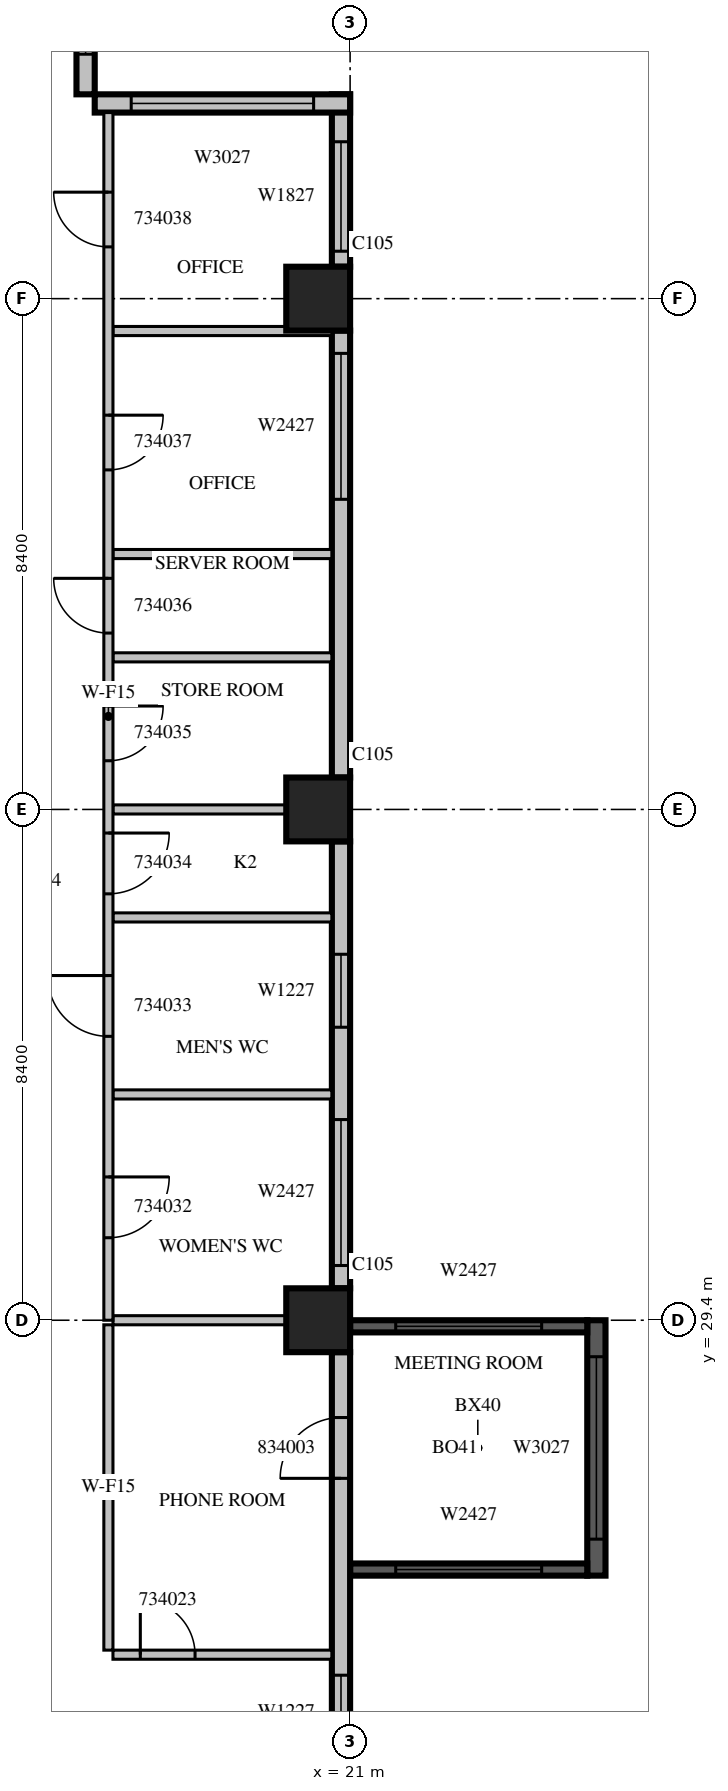
"""IFC4 building model, lengths in metres.
Left out: names, types, materials, properties, quantities, classifications, styles, units other than length and angle.
Written with IfcOpenShell. Run it as: python <this file> out.ifc"""

import sys

from ifc_helpers import new_model, si_unit, direction, frame, frame_2d, origin, origin_2d, place, context, subcontext, project, spatial, rectangle, extrude, source, transform, mapped, element, fill, save


model = new_model("IFC4")
c1 = context("Model", 3, precision=1e-05, world=origin(), true_north=direction((0.0, 1.0)))
c2 = subcontext(c1, "Body", "Model", "MODEL_VIEW")
j1 = project(units=[si_unit("LENGTHUNIT", "METRE"), si_unit("PLANEANGLEUNIT", "RADIAN")], contexts=[c1])
p1 = place(None, origin())
s1 = spatial("IfcSite", under=j1, at=p1, CompositionType="ELEMENT")
p2 = place(p1, origin())
s2 = spatial("IfcBuilding", under=s1, at=p2, CompositionType="ELEMENT")
p3 = place(p2, frame((0.0, 0.0, 153.9)))
s3 = spatial("IfcBuildingStorey", under=s2, at=p3, CompositionType="ELEMENT", Elevation=153.9)
m1 = source(origin(), c2, "Body", "SweptSolid", [
    extrude(rectangle(XDim=1.05, YDim=1.05, at=origin_2d()), origin(), (0.0, 0.0, 1.0), 4.2),
])
for number, where, z_axis, x_axis in (
    (1, (20.475, 29.4, 0.0), (0.0, 0.0, 1.0), (1.0, 0.0, 0.0)),
    (2, (20.475, 37.8, 0.0), (0.0, 0.0, 1.0), (1.0, 0.0, 0.0)),
    (3, (20.475, 46.2, 0.0), (0.0, 0.0, 1.0), (1.0, 0.0, 0.0)),
):
    element("IfcColumn", number, at=place(p3, frame(where, z_axis=z_axis, x_axis=x_axis)), inside=s3, PredefinedType="COLUMN", context=c2, shape_type="MappedRepresentation", body=[
        mapped(m1, transform((0.0, 0.0, 0.0), scale=1.0)),
    ])
m2 = source(origin(), c2, "Body", "SweptSolid", [
    extrude(rectangle(XDim=4.2, YDim=0.3, at=frame_2d((2.1, 0.0))), origin(), (0.0, 0.0, 1.0), 3.8),
])
p4 = place(p3, frame((25.05, 25.2, 0.0), z_axis=(0.0, 0.0, 1.0), x_axis=(0.0, 1.0, 0.0)))
e4 = element("IfcWall", 4, at=p4, inside=s3, PredefinedType="SOLIDWALL", context=c2, shape_type="MappedRepresentation", body=[
    mapped(m2, transform((0.0, 0.0, 0.0), scale=1.0)),
])
m3 = source(origin(), c2, "Body", "SweptSolid", [
    extrude(rectangle(XDim=3.0, YDim=2.7, at=frame_2d((1.5, 1.35))), frame((0.0, 0.16, 0.0), z_axis=(0.0, -1.0, 0.0), x_axis=(1.0, 0.0, 0.0)), (0.0, 0.0, 1.0), 0.32),
])
p5 = place(p4, frame((0.6, 0.0, 0.6)))
e5 = element("IfcOpeningElement", 5, at=p5, cuts=e4, PredefinedType="OPENING", context=c2, shape_type="MappedRepresentation", body=[
    mapped(m3, transform((0.0, 0.0, 0.0), scale=1.0)),
])
m4 = source(origin(), c2, "Body", "SweptSolid", [
    extrude(rectangle(XDim=3.9, YDim=0.2, at=frame_2d((1.95, 0.0))), origin(), (0.0, 0.0, 1.0), 3.8),
])
p6 = place(p3, frame((21.0, 25.3, 0.0), z_axis=(0.0, 0.0, 1.0), x_axis=(1.0, 0.0, 0.0)))
e6 = element("IfcWall", 6, at=p6, inside=s3, PredefinedType="SOLIDWALL", context=c2, shape_type="MappedRepresentation", body=[
    mapped(m4, transform((0.0, 0.0, 0.0), scale=1.0)),
])
m5 = source(origin(), c2, "Body", "SweptSolid", [
    extrude(rectangle(XDim=2.4, YDim=2.7, at=frame_2d((1.2, 1.35))), frame((0.0, 0.11, 0.0), z_axis=(0.0, -1.0, 0.0), x_axis=(1.0, 0.0, 0.0)), (0.0, 0.0, 1.0), 0.22),
])
p7 = place(p6, frame((0.75, 0.0, 0.6)))
e7 = element("IfcOpeningElement", 7, at=p7, cuts=e6, PredefinedType="OPENING", context=c2, shape_type="MappedRepresentation", body=[
    mapped(m5, transform((0.0, 0.0, 0.0), scale=1.0)),
])
p8 = place(p3, frame((21.0, 29.3, 0.0), z_axis=(0.0, 0.0, 1.0), x_axis=(1.0, 0.0, 0.0)))
e8 = element("IfcWall", 8, at=p8, inside=s3, PredefinedType="SOLIDWALL", context=c2, shape_type="MappedRepresentation", body=[
    mapped(m4, transform((0.0, 0.0, 0.0), scale=1.0)),
])
p9 = place(p8, frame((0.75, 0.0, 0.6)))
e9 = element("IfcOpeningElement", 9, at=p9, cuts=e8, PredefinedType="OPENING", context=c2, shape_type="MappedRepresentation", body=[
    mapped(m5, transform((0.0, 0.0, 0.0), scale=1.0)),
])
m6 = source(origin(), c2, "Body", "SweptSolid", [
    extrude(rectangle(XDim=6.875, YDim=0.3, at=frame_2d((3.438, 0.0))), origin(), (0.0, 0.0, 1.0), 3.8),
])
p10 = place(p3, frame((20.85, 22.0, 0.0), z_axis=(0.0, 0.0, 1.0), x_axis=(0.0, 1.0, 0.0)))
e10 = element("IfcWall", 10, at=p10, inside=s3, PredefinedType="STANDARD", context=c2, shape_type="MappedRepresentation", body=[
    mapped(m6, transform((0.0, 0.0, 0.0), scale=1.0)),
])
m7 = source(origin(), c2, "Body", "SweptSolid", [
    extrude(rectangle(XDim=1.2, YDim=2.7, at=frame_2d((0.6, 1.35))), frame((0.0, 0.16, 0.0), z_axis=(0.0, -1.0, 0.0), x_axis=(1.0, 0.0, 0.0)), (0.0, 0.0, 1.0), 0.32),
])
p11 = place(p10, frame((0.362, 0.0, 0.6)))
e11 = element("IfcOpeningElement", 11, at=p11, cuts=e10, PredefinedType="OPENING", context=c2, shape_type="MappedRepresentation", body=[
    mapped(m7, transform((0.0, 0.0, 0.0), scale=1.0)),
])
m8 = source(origin(), c2, "Body", "SweptSolid", [
    extrude(rectangle(XDim=1.0, YDim=2.1, at=frame_2d((0.5, 1.05))), frame((0.0, 0.16, 0.0), z_axis=(0.0, -1.0, 0.0), x_axis=(1.0, 0.0, 0.0)), (0.0, 0.0, 1.0), 0.32),
])
p12 = place(p10, frame((4.8, 0.0, 0.0)))
e12 = element("IfcOpeningElement", 12, at=p12, cuts=e10, PredefinedType="OPENING", context=c2, shape_type="MappedRepresentation", body=[
    mapped(m8, transform((0.0, 0.0, 0.0), scale=1.0)),
])
m9 = source(origin(), c2, "Body", "SweptSolid", [
    extrude(rectangle(XDim=7.35, YDim=0.3, at=frame_2d((3.675, 0.0))), origin(), (0.0, 0.0, 1.0), 3.8),
])
p13 = place(p3, frame((20.85, 29.925, 0.0), z_axis=(0.0, 0.0, 1.0), x_axis=(0.0, 1.0, 0.0)))
e13 = element("IfcWall", 13, at=p13, inside=s3, PredefinedType="STANDARD", context=c2, shape_type="MappedRepresentation", body=[
    mapped(m9, transform((0.0, 0.0, 0.0), scale=1.0)),
])
m10 = source(origin(), c2, "Body", "SweptSolid", [
    extrude(rectangle(XDim=2.4, YDim=2.7, at=frame_2d((1.2, 1.35))), frame((0.0, 0.16, 0.0), z_axis=(0.0, -1.0, 0.0), x_axis=(1.0, 0.0, 0.0)), (0.0, 0.0, 1.0), 0.32),
])
p14 = place(p13, frame((0.375, 0.0, 0.6)))
e14 = element("IfcOpeningElement", 14, at=p14, cuts=e13, PredefinedType="OPENING", context=c2, shape_type="MappedRepresentation", body=[
    mapped(m10, transform((0.0, 0.0, 0.0), scale=1.0)),
])
p15 = place(p13, frame((4.293, 0.0, 0.6)))
e15 = element("IfcOpeningElement", 15, at=p15, cuts=e13, PredefinedType="OPENING", context=c2, shape_type="MappedRepresentation", body=[
    mapped(m7, transform((0.0, 0.0, 0.0), scale=1.0)),
])
p16 = place(p3, frame((20.85, 38.325, 0.0), z_axis=(0.0, 0.0, 1.0), x_axis=(0.0, 1.0, 0.0)))
e16 = element("IfcWall", 16, at=p16, inside=s3, PredefinedType="STANDARD", context=c2, shape_type="MappedRepresentation", body=[
    mapped(m9, transform((0.0, 0.0, 0.0), scale=1.0)),
])
p17 = place(p16, frame((4.575, 0.0, 0.6)))
e17 = element("IfcOpeningElement", 17, at=p17, cuts=e16, PredefinedType="OPENING", context=c2, shape_type="MappedRepresentation", body=[
    mapped(m10, transform((0.0, 0.0, 0.0), scale=1.0)),
])
m11 = source(origin(), c2, "Body", "SweptSolid", [
    extrude(rectangle(XDim=2.835, YDim=0.3, at=frame_2d((1.417, 0.0))), origin(), (0.0, 0.0, 1.0), 3.8),
])
p18 = place(p3, frame((20.85, 46.725, 0.0), z_axis=(0.0, 0.0, 1.0), x_axis=(0.0, 1.0, 0.0)))
e18 = element("IfcWall", 18, at=p18, inside=s3, PredefinedType="STANDARD", context=c2, shape_type="MappedRepresentation", body=[
    mapped(m11, transform((0.0, 0.0, 0.0), scale=1.0)),
])
m12 = source(origin(), c2, "Body", "SweptSolid", [
    extrude(rectangle(XDim=1.8, YDim=2.7, at=frame_2d((0.9, 1.35))), frame((0.0, 0.16, 0.0), z_axis=(0.0, -1.0, 0.0), x_axis=(1.0, 0.0, 0.0)), (0.0, 0.0, 1.0), 0.32),
])
p19 = place(p18, frame((0.255, 0.0, 0.6)))
e19 = element("IfcOpeningElement", 19, at=p19, cuts=e18, PredefinedType="OPENING", context=c2, shape_type="MappedRepresentation", body=[
    mapped(m12, transform((0.0, 0.0, 0.0), scale=1.0)),
])
m13 = source(origin(), c2, "Body", "SweptSolid", [
    extrude(rectangle(XDim=4.2, YDim=0.3, at=frame_2d((2.1, 0.0))), origin(), (0.0, 0.0, 1.0), 3.8),
])
p20 = place(p3, frame((21.0, 49.41, 0.0), z_axis=(0.0, 0.0, 1.0), x_axis=(-1.0, 0.0, 0.0)))
e20 = element("IfcWall", 20, at=p20, inside=s3, PredefinedType="STANDARD", context=c2, shape_type="MappedRepresentation", body=[
    mapped(m13, transform((0.0, 0.0, 0.0), scale=1.0)),
])
p21 = place(p20, frame((0.6, 0.0, 0.6)))
e21 = element("IfcOpeningElement", 21, at=p21, cuts=e20, PredefinedType="OPENING", context=c2, shape_type="MappedRepresentation", body=[
    mapped(m3, transform((0.0, 0.0, 0.0), scale=1.0)),
])
m14 = source(origin(), c2, "Body", "SweptSolid", [
    extrude(rectangle(XDim=2.52, YDim=0.3, at=frame_2d((1.26, 0.0))), origin(), (0.0, 0.0, 1.0), 3.8),
])
p22 = place(p3, frame((16.65, 49.56, 0.0), z_axis=(0.0, 0.0, 1.0), x_axis=(0.0, 1.0, 0.0)))
e22 = element("IfcWall", 22, at=p22, inside=s3, PredefinedType="STANDARD", context=c2, shape_type="MappedRepresentation", body=[
    mapped(m14, transform((0.0, 0.0, 0.0), scale=1.0)),
])
p23 = place(p22, frame((0.66, 0.0, 0.6)))
e23 = element("IfcOpeningElement", 23, at=p23, cuts=e22, PredefinedType="OPENING", context=c2, shape_type="MappedRepresentation", body=[
    mapped(m7, transform((0.0, 0.0, 0.0), scale=1.0)),
])
m15 = source(origin(), c2, "Body", "SweptSolid", [
    extrude(rectangle(XDim=3.6, YDim=0.15, at=frame_2d((1.8, 0.0))), origin(), (0.0, 0.0, 1.0), 3.8),
])
p24 = place(p3, frame((17.1, 23.9, 0.0), z_axis=(0.0, 0.0, 1.0), x_axis=(1.0, 0.0, 0.0)))
e24 = element("IfcWall", 24, at=p24, inside=s3, PredefinedType="PARTITIONING", context=c2, shape_type="MappedRepresentation", body=[
    mapped(m15, transform((0.0, 0.0, 0.0), scale=1.0)),
])
m16 = source(origin(), c2, "Body", "SweptSolid", [
    extrude(rectangle(XDim=0.9, YDim=2.1, at=frame_2d((0.45, 1.05))), frame((0.0, 0.085, 0.0), z_axis=(0.0, -1.0, 0.0), x_axis=(1.0, 0.0, 0.0)), (0.0, 0.0, 1.0), 0.17),
])
p25 = place(p24, frame((0.45, 0.0, 0.0)))
e25 = element("IfcOpeningElement", 25, at=p25, cuts=e24, PredefinedType="OPENING", context=c2, shape_type="MappedRepresentation", body=[
    mapped(m16, transform((0.0, 0.0, 0.0), scale=1.0)),
])
m17 = source(origin(), c2, "Body", "SweptSolid", [
    extrude(rectangle(XDim=5.35, YDim=0.15, at=frame_2d((2.675, 0.0))), origin(), (0.0, 0.0, 1.0), 3.8),
])
p26 = place(p3, frame((17.025, 29.325, 0.0), z_axis=(0.0, 0.0, 1.0), x_axis=(0.0, -1.0, 0.0)))
e26 = element("IfcWall", 26, at=p26, inside=s3, PredefinedType="PARTITIONING", context=c2, shape_type="MappedRepresentation", body=[
    mapped(m17, transform((0.0, 0.0, 0.0), scale=1.0)),
])
m18 = source(origin(), c2, "Body", "SweptSolid", [
    extrude(rectangle(XDim=2.851, YDim=0.15, at=frame_2d((1.425, 0.0))), origin(), (0.0, 0.0, 1.0), 3.8),
])
p27 = place(p3, frame((19.951, 29.4, 0.0), z_axis=(0.0, 0.0, 1.0), x_axis=(-1.0, 0.0, 0.0)))
e27 = element("IfcWall", 27, at=p27, inside=s3, PredefinedType="PARTITIONING", context=c2, shape_type="MappedRepresentation", body=[
    mapped(m18, transform((0.0, 0.0, 0.0), scale=1.0)),
])
for number, where, z_axis, x_axis in (
    (28, (17.1, 33.113, 0.0), (0.0, 0.0, 1.0), (1.0, 0.0, 0.0)),
    (29, (17.1, 36.024, 0.0), (0.0, 0.0, 1.0), (1.0, 0.0, 0.0)),
    (30, (17.1, 40.301, 0.0), (0.0, 0.0, 1.0), (1.0, 0.0, 0.0)),
    (31, (17.1, 45.667, 0.0), (0.0, 0.0, 1.0), (1.0, 0.0, 0.0)),
):
    element("IfcWall", number, at=place(p3, frame(where, z_axis=z_axis, x_axis=x_axis)), inside=s3, PredefinedType="PARTITIONING", context=c2, shape_type="MappedRepresentation", body=[
        mapped(m15, transform((0.0, 0.0, 0.0), scale=1.0)),
    ])
p28 = place(p3, frame((19.951, 37.8, 0.0), z_axis=(0.0, 0.0, 1.0), x_axis=(-1.0, 0.0, 0.0)))
e32 = element("IfcWall", 32, at=p28, inside=s3, PredefinedType="PARTITIONING", context=c2, shape_type="MappedRepresentation", body=[
    mapped(m18, transform((0.0, 0.0, 0.0), scale=1.0)),
])
p29 = place(p3, frame((20.7, 42.0, 0.0), z_axis=(0.0, 0.0, 1.0), x_axis=(-1.0, 0.0, 0.0)))
e33 = element("IfcWall", 33, at=p29, inside=s3, PredefinedType="PARTITIONING", context=c2, shape_type="MappedRepresentation", body=[
    mapped(m15, transform((0.0, 0.0, 0.0), scale=1.0)),
])
m19 = source(origin(), c2, "Body", "SweptSolid", [
    extrude(rectangle(XDim=19.86, YDim=0.15, at=frame_2d((9.93, 0.0))), origin(), (0.0, 0.0, 1.0), 3.8),
])
p30 = place(p3, frame((17.025, 49.26, 0.0), z_axis=(0.0, 0.0, 1.0), x_axis=(0.0, -1.0, 0.0)))
e34 = element("IfcWall", 34, at=p30, inside=s3, PredefinedType="PARTITIONING", context=c2, shape_type="MappedRepresentation", body=[
    mapped(m19, transform((0.0, 0.0, 0.0), scale=1.0)),
])
m20 = source(origin(), c2, "Body", "SweptSolid", [
    extrude(rectangle(XDim=1.0, YDim=2.1, at=frame_2d((0.5, 1.05))), frame((0.0, 0.085, 0.0), z_axis=(0.0, -1.0, 0.0), x_axis=(1.0, 0.0, 0.0)), (0.0, 0.0, 1.0), 0.17),
])
p31 = place(p30, frame((17.503, 0.0, 0.0)))
e35 = element("IfcOpeningElement", 35, at=p31, cuts=e34, PredefinedType="OPENING", context=c2, shape_type="MappedRepresentation", body=[
    mapped(m20, transform((0.0, 0.0, 0.0), scale=1.0)),
])
p32 = place(p30, frame((14.191, 0.0, 0.0)))
e36 = element("IfcOpeningElement", 36, at=p32, cuts=e34, PredefinedType="OPENING", context=c2, shape_type="MappedRepresentation", body=[
    mapped(m20, transform((0.0, 0.0, 0.0), scale=1.0)),
])
p33 = place(p30, frame((11.848, 0.0, 0.0)))
e37 = element("IfcOpeningElement", 37, at=p33, cuts=e34, PredefinedType="OPENING", context=c2, shape_type="MappedRepresentation", body=[
    mapped(m20, transform((0.0, 0.0, 0.0), scale=1.0)),
])
p34 = place(p30, frame((9.759, 0.0, 0.0)))
e38 = element("IfcOpeningElement", 38, at=p34, cuts=e34, PredefinedType="OPENING", context=c2, shape_type="MappedRepresentation", body=[
    mapped(m16, transform((0.0, 0.0, 0.0), scale=1.0)),
])
p35 = place(p30, frame((7.659, 0.0, 0.0)))
e39 = element("IfcOpeningElement", 39, at=p35, cuts=e34, PredefinedType="OPENING", context=c2, shape_type="MappedRepresentation", body=[
    mapped(m16, transform((0.0, 0.0, 0.0), scale=1.0)),
])
p36 = place(p30, frame((4.976, 0.0, 0.0)))
e40 = element("IfcOpeningElement", 40, at=p36, cuts=e34, PredefinedType="OPENING", context=c2, shape_type="MappedRepresentation", body=[
    mapped(m16, transform((0.0, 0.0, 0.0), scale=1.0)),
])
p37 = place(p30, frame((1.309, 0.0, 0.0)))
e41 = element("IfcOpeningElement", 41, at=p37, cuts=e34, PredefinedType="OPENING", context=c2, shape_type="MappedRepresentation", body=[
    mapped(m16, transform((0.0, 0.0, 0.0), scale=1.0)),
])
m21 = source(origin(), c2, "Body", "SweptSolid", [
    extrude(rectangle(XDim=3.0, YDim=2.7, at=frame_2d((1.5, 1.35))), frame((0.0, 0.03, 0.0), z_axis=(0.0, -1.0, 0.0), x_axis=(1.0, 0.0, 0.0)), (0.0, 0.0, 1.0), 0.06),
])
p38 = place(p5, origin())
e42 = element("IfcWindow", 42, at=p38, inside=s3, PartitioningType="SINGLE_PANEL", PredefinedType="WINDOW", context=c2, shape_type="MappedRepresentation", body=[
    mapped(m21, transform((0.0, 0.0, 0.0), scale=1.0)),
])
fill(e5, e42)
m22 = source(origin(), c2, "Body", "SweptSolid", [
    extrude(rectangle(XDim=2.4, YDim=2.7, at=frame_2d((1.2, 1.35))), frame((0.0, 0.03, 0.0), z_axis=(0.0, -1.0, 0.0), x_axis=(1.0, 0.0, 0.0)), (0.0, 0.0, 1.0), 0.06),
])
p39 = place(p7, origin())
e43 = element("IfcWindow", 43, at=p39, inside=s3, PartitioningType="SINGLE_PANEL", PredefinedType="WINDOW", context=c2, shape_type="MappedRepresentation", body=[
    mapped(m22, transform((0.0, 0.0, 0.0), scale=1.0)),
])
fill(e7, e43)
p40 = place(p9, origin())
e44 = element("IfcWindow", 44, at=p40, inside=s3, PartitioningType="SINGLE_PANEL", PredefinedType="WINDOW", context=c2, shape_type="MappedRepresentation", body=[
    mapped(m22, transform((0.0, 0.0, 0.0), scale=1.0)),
])
fill(e9, e44)
m23 = source(origin(), c2, "Body", "SweptSolid", [
    extrude(rectangle(XDim=1.2, YDim=2.7, at=frame_2d((0.6, 1.35))), frame((0.0, 0.03, 0.0), z_axis=(0.0, -1.0, 0.0), x_axis=(1.0, 0.0, 0.0)), (0.0, 0.0, 1.0), 0.06),
])
p41 = place(p11, origin())
e45 = element("IfcWindow", 45, at=p41, inside=s3, PartitioningType="SINGLE_PANEL", PredefinedType="WINDOW", context=c2, shape_type="MappedRepresentation", body=[
    mapped(m23, transform((0.0, 0.0, 0.0), scale=1.0)),
])
fill(e11, e45)
p42 = place(p14, origin())
e46 = element("IfcWindow", 46, at=p42, inside=s3, PartitioningType="SINGLE_PANEL", PredefinedType="WINDOW", context=c2, shape_type="MappedRepresentation", body=[
    mapped(m22, transform((0.0, 0.0, 0.0), scale=1.0)),
])
fill(e14, e46)
p43 = place(p15, origin())
e47 = element("IfcWindow", 47, at=p43, inside=s3, PartitioningType="SINGLE_PANEL", PredefinedType="WINDOW", context=c2, shape_type="MappedRepresentation", body=[
    mapped(m23, transform((0.0, 0.0, 0.0), scale=1.0)),
])
fill(e15, e47)
p44 = place(p17, origin())
e48 = element("IfcWindow", 48, at=p44, inside=s3, PartitioningType="SINGLE_PANEL", PredefinedType="WINDOW", context=c2, shape_type="MappedRepresentation", body=[
    mapped(m22, transform((0.0, 0.0, 0.0), scale=1.0)),
])
fill(e17, e48)
m24 = source(origin(), c2, "Body", "SweptSolid", [
    extrude(rectangle(XDim=1.8, YDim=2.7, at=frame_2d((0.9, 1.35))), frame((0.0, 0.03, 0.0), z_axis=(0.0, -1.0, 0.0), x_axis=(1.0, 0.0, 0.0)), (0.0, 0.0, 1.0), 0.06),
])
p45 = place(p19, origin())
e49 = element("IfcWindow", 49, at=p45, inside=s3, PartitioningType="SINGLE_PANEL", PredefinedType="WINDOW", context=c2, shape_type="MappedRepresentation", body=[
    mapped(m24, transform((0.0, 0.0, 0.0), scale=1.0)),
])
fill(e19, e49)
p46 = place(p21, origin())
e50 = element("IfcWindow", 50, at=p46, inside=s3, PartitioningType="SINGLE_PANEL", PredefinedType="WINDOW", context=c2, shape_type="MappedRepresentation", body=[
    mapped(m21, transform((0.0, 0.0, 0.0), scale=1.0)),
])
fill(e21, e50)
p47 = place(p23, origin())
e51 = element("IfcWindow", 51, at=p47, inside=s3, PartitioningType="SINGLE_PANEL", PredefinedType="WINDOW", context=c2, shape_type="MappedRepresentation", body=[
    mapped(m23, transform((0.0, 0.0, 0.0), scale=1.0)),
])
fill(e23, e51)
m25 = source(origin(), c2, "Body", "SweptSolid", [
    extrude(rectangle(XDim=0.9, YDim=2.1, at=frame_2d((0.45, 1.05))), frame((0.0, 0.025, 0.0), z_axis=(0.0, -1.0, 0.0), x_axis=(1.0, 0.0, 0.0)), (0.0, 0.0, 1.0), 0.05),
])
p48 = place(p25, origin())
e52 = element("IfcDoor", 52, at=p48, inside=s3, OperationType="SINGLE_SWING_LEFT", PredefinedType="DOOR", context=c2, shape_type="MappedRepresentation", body=[
    mapped(m25, transform((0.0, 0.0, 0.0), scale=1.0)),
])
fill(e25, e52)
m26 = source(origin(), c2, "Body", "SweptSolid", [
    extrude(rectangle(XDim=1.0, YDim=2.1, at=frame_2d((0.5, 1.05))), frame((0.0, 0.025, 0.0), z_axis=(0.0, -1.0, 0.0), x_axis=(1.0, 0.0, 0.0)), (0.0, 0.0, 1.0), 0.05),
])
p49 = place(p31, origin())
e53 = element("IfcDoor", 53, at=p49, inside=s3, OperationType="SINGLE_SWING_LEFT", PredefinedType="DOOR", context=c2, shape_type="MappedRepresentation", body=[
    mapped(m26, transform((0.0, 0.0, 0.0), scale=1.0)),
])
fill(e35, e53)
p50 = place(p32, origin())
e54 = element("IfcDoor", 54, at=p50, inside=s3, OperationType="SINGLE_SWING_RIGHT", PredefinedType="DOOR", context=c2, shape_type="MappedRepresentation", body=[
    mapped(m26, transform((0.0, 0.0, 0.0), scale=1.0)),
])
fill(e36, e54)
p51 = place(p33, origin())
e55 = element("IfcDoor", 55, at=p51, inside=s3, OperationType="SINGLE_SWING_LEFT", PredefinedType="DOOR", context=c2, shape_type="MappedRepresentation", body=[
    mapped(m26, transform((0.0, 0.0, 0.0), scale=1.0)),
])
fill(e37, e55)
p52 = place(p34, origin())
e56 = element("IfcDoor", 56, at=p52, inside=s3, OperationType="SINGLE_SWING_LEFT", PredefinedType="DOOR", context=c2, shape_type="MappedRepresentation", body=[
    mapped(m25, transform((0.0, 0.0, 0.0), scale=1.0)),
])
fill(e38, e56)
p53 = place(p35, origin())
e57 = element("IfcDoor", 57, at=p53, inside=s3, OperationType="SINGLE_SWING_RIGHT", PredefinedType="DOOR", context=c2, shape_type="MappedRepresentation", body=[
    mapped(m25, transform((0.0, 0.0, 0.0), scale=1.0)),
])
fill(e39, e57)
p54 = place(p36, origin())
e58 = element("IfcDoor", 58, at=p54, inside=s3, OperationType="SINGLE_SWING_LEFT", PredefinedType="DOOR", context=c2, shape_type="MappedRepresentation", body=[
    mapped(m25, transform((0.0, 0.0, 0.0), scale=1.0)),
])
fill(e40, e58)
p55 = place(p37, origin())
e59 = element("IfcDoor", 59, at=p55, inside=s3, OperationType="SINGLE_SWING_RIGHT", PredefinedType="DOOR", context=c2, shape_type="MappedRepresentation", body=[
    mapped(m25, transform((0.0, 0.0, 0.0), scale=1.0)),
])
fill(e41, e59)
p56 = place(p12, origin())
e60 = element("IfcDoor", 60, at=p56, inside=s3, OperationType="SINGLE_SWING_LEFT", PredefinedType="DOOR", context=c2, shape_type="MappedRepresentation", body=[
    mapped(m26, transform((0.0, 0.0, 0.0), scale=1.0)),
])
fill(e12, e60)
save(model, sys.argv[1])
